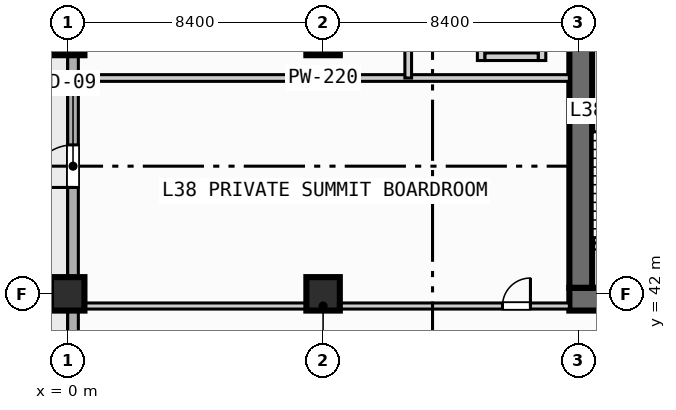
"""IFC4 building model, lengths in metres.
Left out: names, types, materials, properties, quantities, classifications, styles, units other than length and angle.
Written with IfcOpenShell. Run it as: python <this file> out.ifc"""

import sys

from ifc_helpers import new_model, si_unit, direction, frame, frame_2d, origin, origin_2d, place, context, subcontext, project, spatial, rectangle, extrude, element, fill, save


model = new_model("IFC4")
c1 = context("Model", 3, precision=1e-05, world=origin(), true_north=direction((0.0, 1.0)))
c2 = subcontext(c1, "Body", "Model", "MODEL_VIEW")
j1 = project(units=[si_unit("LENGTHUNIT", "METRE"), si_unit("PLANEANGLEUNIT", "RADIAN")], contexts=[c1])
p1 = place(None, origin())
s1 = spatial("IfcSite", under=j1, at=p1, CompositionType="ELEMENT")
p2 = place(p1, origin())
s2 = spatial("IfcBuilding", under=s1, at=p2, CompositionType="ELEMENT")
p3 = place(p2, frame((0.0, 0.0, 157.6)))
s3 = spatial("IfcBuildingStorey", under=s2, at=p3, CompositionType="ELEMENT", Elevation=157.6)
p4 = place(p3, frame((16.5, 41.825, 0.0), z_axis=(0.0, 0.0, 1.0), x_axis=(1.0, 0.0, 0.0)))
e1 = element("IfcWall", 1, at=p4, inside=s3, PredefinedType="SHEAR", context=c2, shape_type="SweptSolid", body=[
    extrude(rectangle(XDim=1.5, YDim=0.75, at=frame_2d((0.75, 0.0))), origin(), (0.0, 0.0, 1.0), 4.05),
])
p5 = place(p3, frame((16.875, 42.2, 0.0), z_axis=(0.0, 0.0, 1.0), x_axis=(0.0, 1.0, 0.0)))
e2 = element("IfcWall", 2, at=p5, inside=s3, PredefinedType="SHEAR", context=c2, shape_type="SweptSolid", body=[
    extrude(rectangle(XDim=16.35, YDim=0.75, at=frame_2d((8.175, 0.0))), origin(), (0.0, 0.0, 1.0), 4.05),
])
for number, where, z_axis, x_axis in (
    (3, (0.0, 42.0, 0.0), (0.0, 0.0, 1.0), (1.0, 0.0, 0.0)),
    (4, (0.0, 50.4, 0.0), (0.0, 0.0, 1.0), (1.0, 0.0, 0.0)),
    (5, (8.4, 42.0, 0.0), (0.0, 0.0, 1.0), (1.0, 0.0, 0.0)),
    (6, (8.4, 50.4, 0.0), (0.0, 0.0, 1.0), (1.0, 0.0, 0.0)),
):
    element("IfcColumn", number, at=place(p3, frame(where, z_axis=z_axis, x_axis=x_axis)), inside=s3, PredefinedType="COLUMN", context=c2, shape_type="SweptSolid", body=[
        extrude(rectangle(XDim=1.1, YDim=1.1, at=origin_2d()), origin(), (0.0, 0.0, 1.0), 4.4),
    ])
p6 = place(p3, frame((0.175, 3.175, 0.0), z_axis=(0.0, 0.0, 1.0), x_axis=(0.0, 1.0, 0.0)))
e7 = element("IfcWall", 7, at=p6, inside=s3, PredefinedType="STANDARD", context=c2, shape_type="SweptSolid", body=[
    extrude(rectangle(XDim=69.25, YDim=0.35, at=frame_2d((34.625, 0.0))), origin(), (0.0, 0.0, 1.0), 4.05),
])
p7 = place(p6, frame((42.325, 0.0, 0.0)))
e8 = element("IfcOpeningElement", 8, at=p7, cuts=e7, PredefinedType="OPENING", context=c2, shape_type="SweptSolid", body=[
    extrude(rectangle(XDim=1.4, YDim=2.2, at=frame_2d((0.7, 1.1))), frame((0.0, 0.185, 0.0), z_axis=(0.0, -1.0, 0.0), x_axis=(1.0, 0.0, 0.0)), (0.0, 0.0, 1.0), 0.37),
])
p8 = place(p6, frame((8.175, 0.0, 0.85)))
e9 = element("IfcOpeningElement", 9, at=p8, cuts=e7, PredefinedType="OPENING", context=c2, shape_type="SweptSolid", body=[
    extrude(rectangle(XDim=2.5, YDim=2.2, at=frame_2d((1.25, 1.1))), frame((0.0, 0.185, 0.0), z_axis=(0.0, -1.0, 0.0), x_axis=(1.0, 0.0, 0.0)), (0.0, 0.0, 1.0), 0.37),
])
p9 = place(p6, frame((16.575, 0.0, 0.85)))
e10 = element("IfcOpeningElement", 10, at=p9, cuts=e7, PredefinedType="OPENING", context=c2, shape_type="SweptSolid", body=[
    extrude(rectangle(XDim=2.5, YDim=2.2, at=frame_2d((1.25, 1.1))), frame((0.0, 0.185, 0.0), z_axis=(0.0, -1.0, 0.0), x_axis=(1.0, 0.0, 0.0)), (0.0, 0.0, 1.0), 0.37),
])
p10 = place(p6, frame((24.975, 0.0, 0.85)))
e11 = element("IfcOpeningElement", 11, at=p10, cuts=e7, PredefinedType="OPENING", context=c2, shape_type="SweptSolid", body=[
    extrude(rectangle(XDim=2.5, YDim=2.2, at=frame_2d((1.25, 1.1))), frame((0.0, 0.185, 0.0), z_axis=(0.0, -1.0, 0.0), x_axis=(1.0, 0.0, 0.0)), (0.0, 0.0, 1.0), 0.37),
])
p11 = place(p6, frame((33.375, 0.0, 0.85)))
e12 = element("IfcOpeningElement", 12, at=p11, cuts=e7, PredefinedType="OPENING", context=c2, shape_type="SweptSolid", body=[
    extrude(rectangle(XDim=2.5, YDim=2.2, at=frame_2d((1.25, 1.1))), frame((0.0, 0.185, 0.0), z_axis=(0.0, -1.0, 0.0), x_axis=(1.0, 0.0, 0.0)), (0.0, 0.0, 1.0), 0.37),
])
p12 = place(p3, frame((13.6, 49.675, 0.0), z_axis=(0.0, 0.0, 1.0), x_axis=(0.0, 1.0, 0.0)))
e13 = element("IfcWall", 13, at=p12, inside=s3, PredefinedType="SOLIDWALL", context=c2, shape_type="SweptSolid", body=[
    extrude(rectangle(XDim=2.75, YDim=0.25, at=frame_2d((1.375, 0.0))), origin(), (0.0, 0.0, 1.0), 4.05),
])
p13 = place(p12, frame((0.4, 0.0, 0.0)))
e14 = element("IfcOpeningElement", 14, at=p13, cuts=e13, PredefinedType="OPENING", context=c2, shape_type="SweptSolid", body=[
    extrude(rectangle(XDim=1.1, YDim=2.15, at=frame_2d((0.55, 1.075))), frame((0.0, 0.135, 0.0), z_axis=(0.0, -1.0, 0.0), x_axis=(1.0, 0.0, 0.0)), (0.0, 0.0, 1.0), 0.27),
])
p14 = place(p3, frame((15.6, 49.675, 0.0), z_axis=(0.0, 0.0, 1.0), x_axis=(0.0, 1.0, 0.0)))
e15 = element("IfcWall", 15, at=p14, inside=s3, PredefinedType="SOLIDWALL", context=c2, shape_type="SweptSolid", body=[
    extrude(rectangle(XDim=2.75, YDim=0.25, at=frame_2d((1.375, 0.0))), origin(), (0.0, 0.0, 1.0), 4.05),
])
p15 = place(p3, frame((13.725, 49.8, 0.0), z_axis=(0.0, 0.0, 1.0), x_axis=(1.0, 0.0, 0.0)))
e16 = element("IfcWall", 16, at=p15, inside=s3, PredefinedType="SOLIDWALL", context=c2, shape_type="SweptSolid", body=[
    extrude(rectangle(XDim=1.75, YDim=0.25, at=frame_2d((0.875, 0.0))), origin(), (0.0, 0.0, 1.0), 4.05),
])
p16 = place(p3, frame((0.3, 41.6, 0.0), z_axis=(0.0, 0.0, 1.0), x_axis=(1.0, 0.0, 0.0)))
e17 = element("IfcWall", 17, at=p16, inside=s3, PredefinedType="PARTITIONING", context=c2, shape_type="SweptSolid", body=[
    extrude(rectangle(XDim=16.2, YDim=0.2, at=frame_2d((8.1, 0.0))), origin(), (0.0, 0.0, 1.0), 4.05),
])
p17 = place(p16, frame((14.0, 0.0, 0.0)))
e18 = element("IfcOpeningElement", 18, at=p17, cuts=e17, PredefinedType="OPENING", context=c2, shape_type="SweptSolid", body=[
    extrude(rectangle(XDim=0.92, YDim=2.1, at=frame_2d((0.46, 1.05))), frame((0.0, 0.11, 0.0), z_axis=(0.0, -1.0, 0.0), x_axis=(1.0, 0.0, 0.0)), (0.0, 0.0, 1.0), 0.22),
])
p18 = place(p3, frame((0.3, 49.1, 0.0), z_axis=(0.0, 0.0, 1.0), x_axis=(1.0, 0.0, 0.0)))
e19 = element("IfcWall", 19, at=p18, inside=s3, PredefinedType="PARTITIONING", context=c2, shape_type="SweptSolid", body=[
    extrude(rectangle(XDim=16.2, YDim=0.22, at=frame_2d((8.1, 0.0))), origin(), (0.0, 0.0, 1.0), 4.05),
])
p19 = place(p3, frame((11.2, 49.1, 0.0), z_axis=(0.0, 0.0, 1.0), x_axis=(0.0, 1.0, 0.0)))
e20 = element("IfcWall", 20, at=p19, inside=s3, PredefinedType="PARTITIONING", context=c2, shape_type="SweptSolid", body=[
    extrude(rectangle(XDim=9.3, YDim=0.22, at=frame_2d((4.65, 0.0))), origin(), (0.0, 0.0, 1.0), 4.05),
])
p20 = place(p7, origin())
e21 = element("IfcDoor", 21, at=p20, inside=s3, OperationType="SINGLE_SWING_LEFT", PredefinedType="DOOR", context=c2, shape_type="SweptSolid", body=[
    extrude(rectangle(XDim=1.4, YDim=2.2, at=frame_2d((0.7, 1.1))), frame((0.0, 0.025, 0.0), z_axis=(0.0, -1.0, 0.0), x_axis=(1.0, 0.0, 0.0)), (0.0, 0.0, 1.0), 0.05),
])
fill(e8, e21)
p21 = place(p17, origin())
e22 = element("IfcDoor", 22, at=p21, inside=s3, OperationType="SINGLE_SWING_RIGHT", PredefinedType="DOOR", context=c2, shape_type="SweptSolid", body=[
    extrude(rectangle(XDim=0.92, YDim=2.1, at=frame_2d((0.46, 1.05))), frame((0.0, 0.025, 0.0), z_axis=(0.0, -1.0, 0.0), x_axis=(1.0, 0.0, 0.0)), (0.0, 0.0, 1.0), 0.05),
])
fill(e18, e22)
save(model, sys.argv[1])
